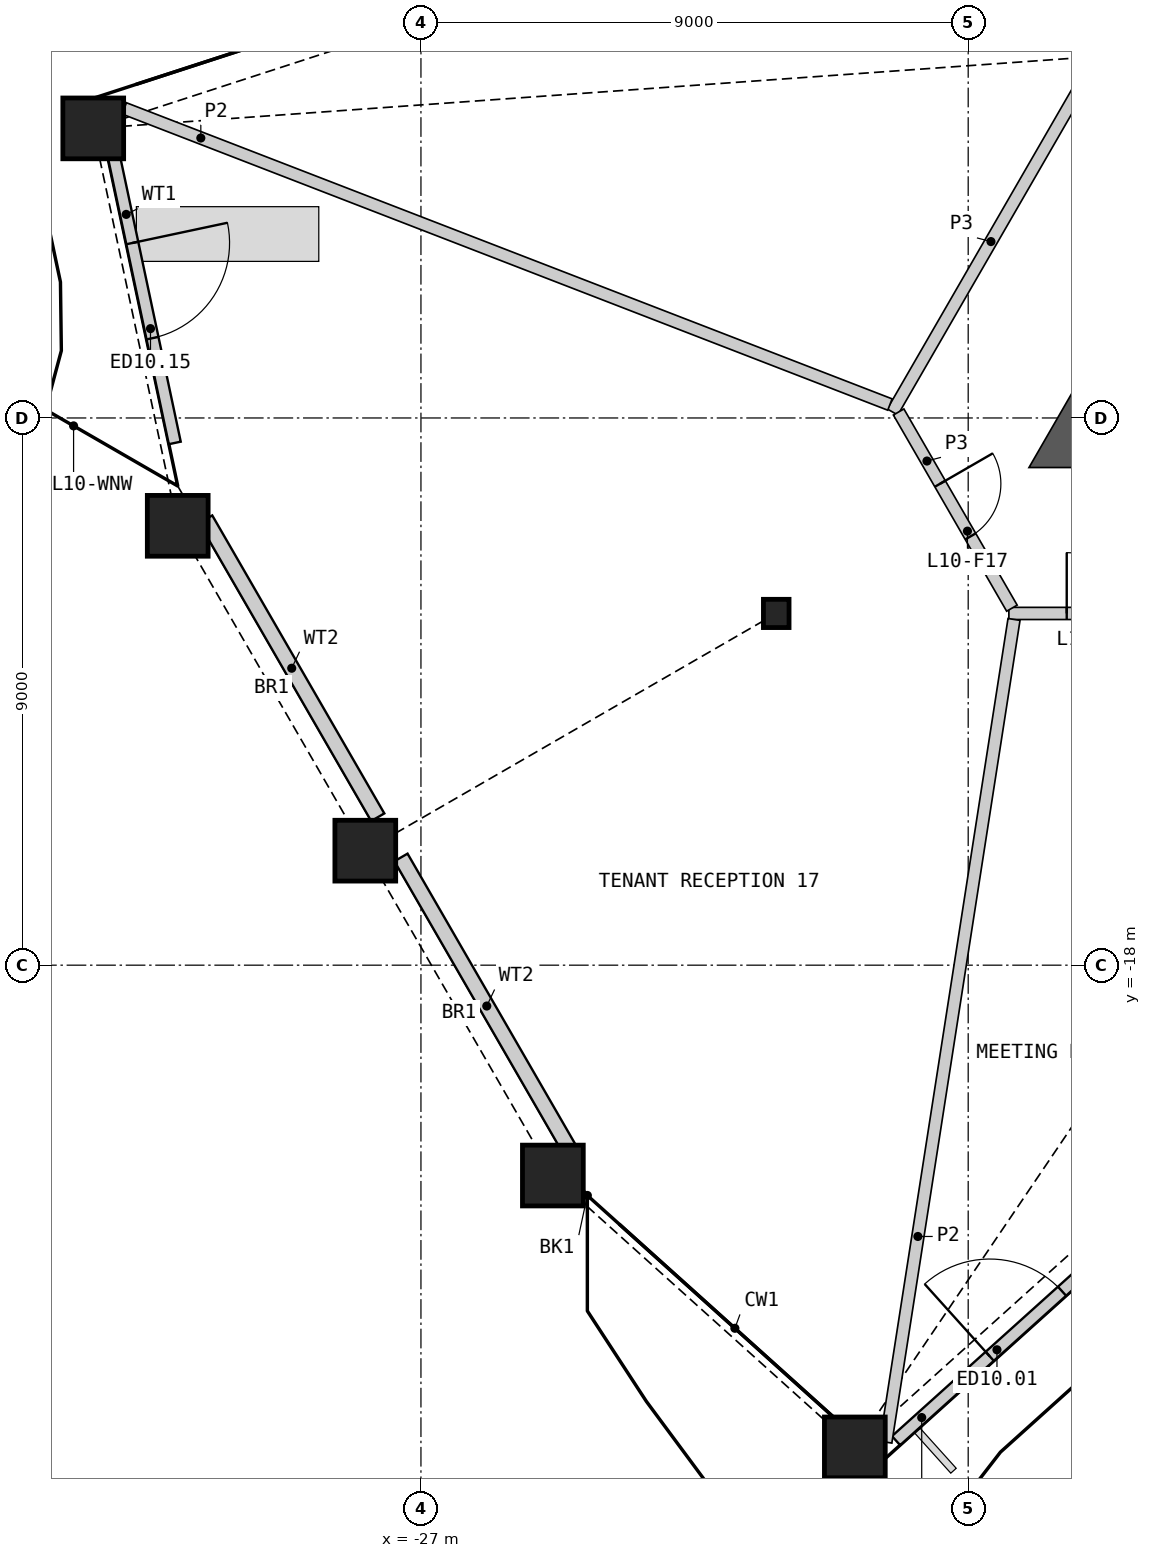
"""IFC4 building model, lengths in metres.
Left out: names, types, materials, properties, quantities, classifications, styles, units other than length and angle.
Written with IfcOpenShell. Run it as: python <this file> out.ifc"""

import sys

from ifc_helpers import new_model, si_unit, direction, frame, frame_2d, origin, origin_2d, place, context, subcontext, project, spatial, polyline, rectangle, hollow_rectangle, i_section, outline, extrude, element, fill, save


model = new_model("IFC4")
c1 = context("Model", 3, precision=1e-05, world=origin(), true_north=direction((0.0, 1.0)))
c2 = subcontext(c1, "Body", "Model", "MODEL_VIEW")
j1 = project(units=[si_unit("LENGTHUNIT", "METRE"), si_unit("PLANEANGLEUNIT", "RADIAN")], contexts=[c1])
p1 = place(None, origin())
s1 = spatial("IfcSite", under=j1, at=p1, CompositionType="ELEMENT")
p2 = place(p1, origin())
s2 = spatial("IfcBuilding", under=s1, at=p2, CompositionType="ELEMENT")
p3 = place(p2, frame((0.0, 0.0, 51.0)))
s3 = spatial("IfcBuildingStorey", under=s2, at=p3, CompositionType="ELEMENT", Elevation=51.0)
for number, where, z_axis, x_axis in (
    (1, (-24.83, -21.46, 0.0), (0.0, 0.0, 1.0), (1.0, 0.0, 0.0)),
    (2, (-19.864, -25.931, 0.0), (0.0, 0.0, 1.0), (1.0, 0.0, 0.0)),
    (3, (-32.389, -4.237, 0.0), (0.0, 0.0, 1.0), (1.0, 0.0, 0.0)),
    (4, (-31.0, -10.774, 0.0), (0.0, 0.0, 1.0), (1.0, 0.0, 0.0)),
    (5, (-27.915, -16.117, 0.0), (0.0, 0.0, 1.0), (1.0, 0.0, 0.0)),
):
    element("IfcColumn", number, at=place(p3, frame(where, z_axis=z_axis, x_axis=x_axis)), inside=s3, PredefinedType="COLUMN", context=c2, shape_type="SweptSolid", body=[
        extrude(hollow_rectangle(XDim=1.0, YDim=1.0, WallThickness=0.07, at=origin_2d()), origin(), (0.0, 0.0, 1.0), 4.2),
    ])
p4 = place(p3, frame((-21.157, -12.215, 0.0), z_axis=(0.0, 0.0, 1.0), x_axis=(1.0, 0.0, 0.0)))
e6 = element("IfcColumn", 6, at=p4, inside=s3, PredefinedType="COLUMN", context=c2, shape_type="SweptSolid", body=[
    extrude(i_section(OverallWidth=0.421, OverallDepth=0.465, WebThickness=0.045, FlangeThickness=0.072, at=origin_2d()), origin(), (0.0, 0.0, 1.0), 4.2),
])
p5 = place(p3, frame((-19.187, -25.82, 0.0), z_axis=(0.0, 0.0, 1.0), x_axis=(0.743142396166, 0.669133304373, 0.0)))
e7 = element("IfcWall", 7, at=p5, inside=s3, PredefinedType="SOLIDWALL", context=c2, shape_type="SweptSolid", body=[
    extrude(rectangle(XDim=5.68, YDim=0.2, at=frame_2d((2.84, 0.0))), origin(), (0.0, 0.0, 1.0), 3.189),
])
p6 = place(p5, frame((2.073, 0.0, 0.0)))
e8 = element("IfcOpeningElement", 8, at=p6, cuts=e7, PredefinedType="OPENING", context=c2, shape_type="SweptSolid", body=[
    extrude(rectangle(XDim=1.6, YDim=2.4, at=frame_2d((0.8, 1.2))), frame((0.0, 0.11, 0.0), z_axis=(0.0, -1.0, 0.0), x_axis=(1.0, 0.0, 0.0)), (0.0, 0.0, 1.0), 0.22),
])
p7 = place(p3, frame((-32.114, -4.399, 0.0), z_axis=(0.0, 0.0, 1.0), x_axis=(0.207931126702, -0.978143469307, 0.0)))
e9 = element("IfcWall", 9, at=p7, inside=s3, PredefinedType="SOLIDWALL", context=c2, shape_type="SweptSolid", body=[
    extrude(rectangle(XDim=5.124, YDim=0.2, at=frame_2d((2.562, 0.0))), origin(), (0.0, 0.0, 1.0), 3.189),
])
p8 = place(p7, frame((1.762, 0.0, 0.0)))
e10 = element("IfcOpeningElement", 10, at=p8, cuts=e9, PredefinedType="OPENING", context=c2, shape_type="SweptSolid", body=[
    extrude(rectangle(XDim=1.6, YDim=2.4, at=frame_2d((0.8, 1.2))), frame((0.0, 0.11, 0.0), z_axis=(0.0, -1.0, 0.0), x_axis=(1.0, 0.0, 0.0)), (0.0, 0.0, 1.0), 0.22),
])
p9 = place(p3, frame((-30.54, -10.665, 0.0), z_axis=(0.0, 0.0, 1.0), x_axis=(0.499985074313, -0.866034020963, 0.0)))
e11 = element("IfcWall", 11, at=p9, inside=s3, PredefinedType="SOLIDWALL", context=c2, shape_type="SweptSolid", body=[
    extrude(rectangle(XDim=5.66, YDim=0.25, at=frame_2d((2.83, 0.0))), origin(), (0.0, 0.0, 1.0), 3.189),
])
p10 = place(p3, frame((-27.329, -16.228, 0.0), z_axis=(0.0, 0.0, 1.0), x_axis=(0.49999579099, -0.866027833844, 0.0)))
e12 = element("IfcWall", 12, at=p10, inside=s3, PredefinedType="SOLIDWALL", context=c2, shape_type="SweptSolid", body=[
    extrude(rectangle(XDim=5.644, YDim=0.25, at=frame_2d((2.822, 0.0))), origin(), (0.0, 0.0, 1.0), 3.189),
])
p11 = place(p3, origin())
e13 = element("IfcWall", 13, at=p11, inside=s3, PredefinedType="SHEAR", context=c2, shape_type="SweptSolid", body=[
    extrude(outline(polyline([(-16.221, -8.465), (-15.441, -8.915), (-15.441, -9.815), (-17.0, -9.815), (-16.221, -8.465)])), origin(), (0.0, 0.0, 1.0), 3.8),
])
p12 = place(p3, frame((-17.331, -12.215, 0.0), z_axis=(0.0, 0.0, 1.0), x_axis=(1.0, 0.0, 0.0)))
e14 = element("IfcWall", 14, at=p12, inside=s3, PredefinedType="PARTITIONING", context=c2, shape_type="SweptSolid", body=[
    extrude(rectangle(XDim=6.51, YDim=0.2, at=frame_2d((3.255, 0.0))), origin(), (0.0, 0.0, 1.0), 3.8),
])
p13 = place(p12, frame((0.951, 0.0, 0.0)))
e15 = element("IfcOpeningElement", 15, at=p13, cuts=e14, PredefinedType="OPENING", context=c2, shape_type="SweptSolid", body=[
    extrude(rectangle(XDim=1.0, YDim=2.1, at=frame_2d((0.5, 1.05))), frame((0.0, 0.11, 0.0), z_axis=(0.0, -1.0, 0.0), x_axis=(1.0, 0.0, 0.0)), (0.0, 0.0, 1.0), 0.22),
])
p14 = place(p3, frame((-19.244, -8.902, 0.0), z_axis=(0.0, 0.0, 1.0), x_axis=(0.499984737558, 0.86603421538, 0.0)))
e16 = element("IfcWall", 16, at=p14, inside=s3, PredefinedType="PARTITIONING", context=c2, shape_type="SweptSolid", body=[
    extrude(rectangle(XDim=6.473, YDim=0.2, at=frame_2d((3.236, 0.0))), origin(), (0.0, 0.0, 1.0), 3.8),
])
p15 = place(p3, frame((-19.144, -8.902, 0.0), z_axis=(0.0, 0.0, 1.0), x_axis=(0.499958791762, -0.866049194065, 0.0)))
e17 = element("IfcWall", 17, at=p15, inside=s3, PredefinedType="PARTITIONING", context=c2, shape_type="SweptSolid", body=[
    extrude(rectangle(XDim=3.726, YDim=0.2, at=frame_2d((1.863, 0.0))), origin(), (0.0, 0.0, 1.0), 3.8),
])
p16 = place(p15, frame((1.363, 0.0, 0.0)))
e18 = element("IfcOpeningElement", 18, at=p16, cuts=e17, PredefinedType="OPENING", context=c2, shape_type="SweptSolid", body=[
    extrude(rectangle(XDim=1.0, YDim=2.1, at=frame_2d((0.5, 1.05))), frame((0.0, 0.11, 0.0), z_axis=(0.0, -1.0, 0.0), x_axis=(1.0, 0.0, 0.0)), (0.0, 0.0, 1.0), 0.22),
])
p17 = place(p3, frame((-19.354, -25.845, 0.0), z_axis=(0.0, 0.0, 1.0), x_axis=(0.153927101979, 0.98808220674, 0.0)))
e19 = element("IfcWall", 19, at=p17, inside=s3, PredefinedType="PARTITIONING", context=c2, shape_type="SweptSolid", body=[
    extrude(rectangle(XDim=13.694, YDim=0.2, at=frame_2d((6.847, 0.0))), origin(), (0.0, 0.0, 1.0), 2.885),
])
p18 = place(p3, frame((-31.879, -3.908, 0.0), z_axis=(0.0, 0.0, 1.0), x_axis=(0.932669586354, -0.360731815467, 0.0)))
e20 = element("IfcWall", 20, at=p18, inside=s3, PredefinedType="PARTITIONING", context=c2, shape_type="SweptSolid", body=[
    extrude(rectangle(XDim=13.501, YDim=0.2, at=frame_2d((6.75, 0.0))), origin(), (0.0, 0.0, 1.0), 2.885),
])
p19 = place(p6, origin())
e21 = element("IfcDoor", 21, at=p19, inside=s3, OperationType="DOUBLE_DOOR_SINGLE_SWING", PredefinedType="DOOR", context=c2, shape_type="SweptSolid", body=[
    extrude(rectangle(XDim=1.6, YDim=2.4, at=frame_2d((0.8, 1.2))), frame((0.0, 0.025, 0.0), z_axis=(0.0, -1.0, 0.0), x_axis=(1.0, 0.0, 0.0)), (0.0, 0.0, 1.0), 0.05),
])
fill(e8, e21)
p20 = place(p8, origin())
e22 = element("IfcDoor", 22, at=p20, inside=s3, OperationType="DOUBLE_DOOR_SINGLE_SWING", PredefinedType="DOOR", context=c2, shape_type="SweptSolid", body=[
    extrude(rectangle(XDim=1.6, YDim=2.4, at=frame_2d((0.8, 1.2))), frame((0.0, 0.025, 0.0), z_axis=(0.0, -1.0, 0.0), x_axis=(1.0, 0.0, 0.0)), (0.0, 0.0, 1.0), 0.05),
])
fill(e10, e22)
p21 = place(p13, origin())
e23 = element("IfcDoor", 23, at=p21, inside=s3, OperationType="SINGLE_SWING_LEFT", PredefinedType="DOOR", context=c2, shape_type="SweptSolid", body=[
    extrude(rectangle(XDim=1.0, YDim=2.1, at=frame_2d((0.5, 1.05))), frame((0.0, 0.025, 0.0), z_axis=(0.0, -1.0, 0.0), x_axis=(1.0, 0.0, 0.0)), (0.0, 0.0, 1.0), 0.05),
])
fill(e15, e23)
p22 = place(p16, origin())
e24 = element("IfcDoor", 24, at=p22, inside=s3, OperationType="SINGLE_SWING_LEFT", PredefinedType="DOOR", context=c2, shape_type="SweptSolid", body=[
    extrude(rectangle(XDim=1.0, YDim=2.1, at=frame_2d((0.5, 1.05))), frame((0.0, 0.025, 0.0), z_axis=(0.0, -1.0, 0.0), x_axis=(1.0, 0.0, 0.0)), (0.0, 0.0, 1.0), 0.05),
])
fill(e18, e24)
save(model, sys.argv[1])
